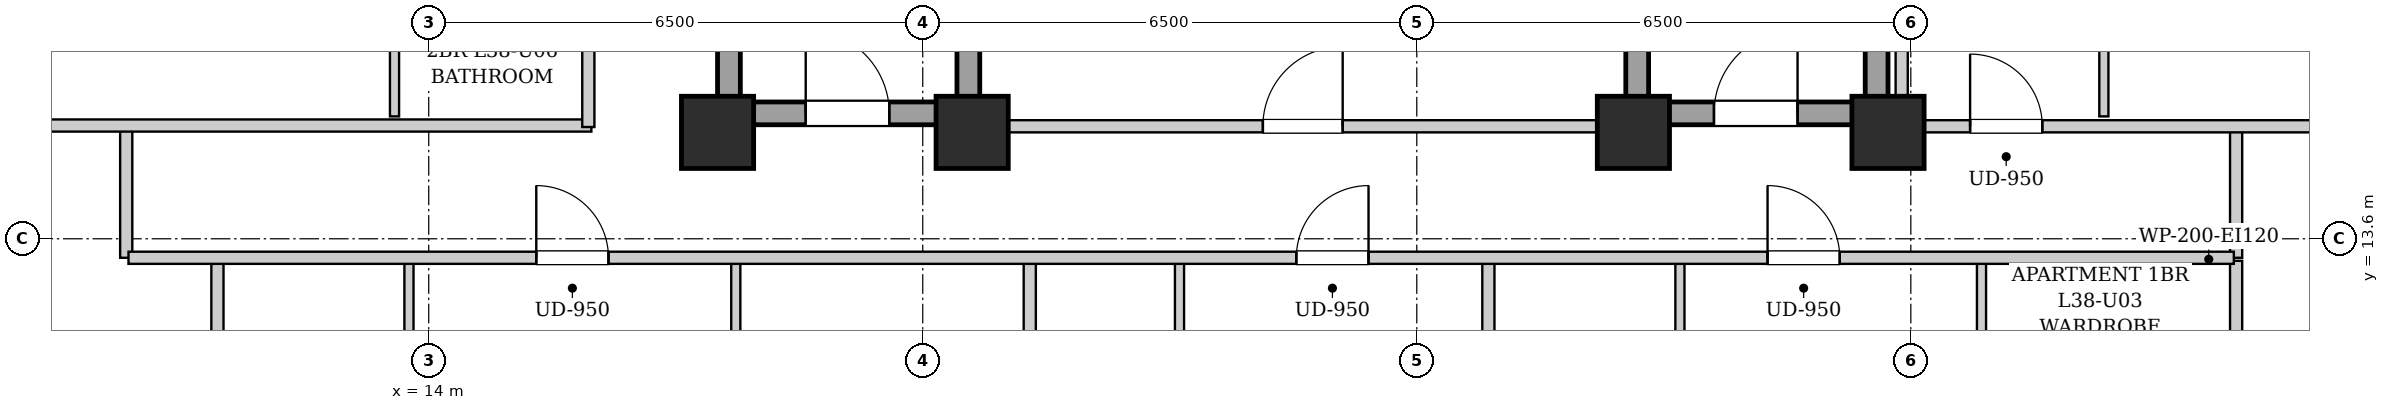
"""IFC4 building model, lengths in metres.
Left out: names, types, materials, properties, quantities, classifications, styles, units other than length and angle.
Written with IfcOpenShell. Run it as: python <this file> out.ifc"""

import sys

from ifc_helpers import new_model, si_unit, direction, frame, frame_2d, origin, origin_2d, place, context, subcontext, project, spatial, rectangle, extrude, element, fill, save


model = new_model("IFC4")
c1 = context("Model", 3, precision=1e-05, world=origin(), true_north=direction((0.0, 1.0)))
c2 = subcontext(c1, "Body", "Model", "MODEL_VIEW")
j1 = project(units=[si_unit("LENGTHUNIT", "METRE"), si_unit("PLANEANGLEUNIT", "RADIAN")], contexts=[c1])
p1 = place(None, origin())
s1 = spatial("IfcSite", under=j1, at=p1, CompositionType="ELEMENT")
p2 = place(p1, origin())
s2 = spatial("IfcBuilding", under=s1, at=p2, CompositionType="ELEMENT")
p3 = place(p2, frame((0.0, 0.0, 134.15)))
s3 = spatial("IfcBuildingStorey", under=s2, at=p3, CompositionType="ELEMENT", Elevation=134.15)
for number, where, z_axis, x_axis in (
    (1, (17.8, 15.0, 0.0), (0.0, 0.0, 1.0), (1.0, 0.0, 0.0)),
    (2, (21.15, 15.0, 0.0), (0.0, 0.0, 1.0), (1.0, 0.0, 0.0)),
    (3, (29.85, 15.0, 0.0), (0.0, 0.0, 1.0), (1.0, 0.0, 0.0)),
    (4, (33.2, 15.0, 0.0), (0.0, 0.0, 1.0), (1.0, 0.0, 0.0)),
):
    element("IfcColumn", number, at=place(p3, frame(where, z_axis=z_axis, x_axis=x_axis)), inside=s3, PredefinedType="COLUMN", context=c2, shape_type="SweptSolid", body=[
        extrude(rectangle(XDim=0.95, YDim=0.95, at=origin_2d()), origin(), (0.0, 0.0, 1.0), 3.25),
    ])
for number, where, z_axis, x_axis in (
    (5, (17.95, 15.1, 0.0), (0.0, 0.0, 1.0), (0.0, 1.0, 0.0)),
    (6, (21.1, 15.1, 0.0), (0.0, 0.0, 1.0), (0.0, 1.0, 0.0)),
):
    element("IfcWall", number, at=place(p3, frame(where, z_axis=z_axis, x_axis=x_axis)), inside=s3, PredefinedType="SHEAR", context=c2, shape_type="SweptSolid", body=[
        extrude(rectangle(XDim=9.0, YDim=0.3, at=frame_2d((4.5, 0.0))), origin(), (0.0, 0.0, 1.0), 2.99),
    ])
p4 = place(p3, frame((18.1, 15.25, 0.0), z_axis=(0.0, 0.0, 1.0), x_axis=(1.0, 0.0, 0.0)))
e7 = element("IfcWall", 7, at=p4, inside=s3, PredefinedType="SHEAR", context=c2, shape_type="SweptSolid", body=[
    extrude(rectangle(XDim=2.85, YDim=0.3, at=frame_2d((1.425, 0.0))), origin(), (0.0, 0.0, 1.0), 2.99),
])
p5 = place(p4, frame((0.86, 0.0, 0.0)))
e8 = element("IfcOpeningElement", 8, at=p5, cuts=e7, PredefinedType="OPENING", context=c2, shape_type="SweptSolid", body=[
    extrude(rectangle(XDim=1.1, YDim=2.05, at=frame_2d((0.55, 1.025))), frame((0.0, 0.16, 0.0), z_axis=(0.0, -1.0, 0.0), x_axis=(1.0, 0.0, 0.0)), (0.0, 0.0, 1.0), 0.32),
])
for number, where, z_axis, x_axis in (
    (9, (29.9, 15.1, 0.0), (0.0, 0.0, 1.0), (0.0, 1.0, 0.0)),
    (10, (33.05, 15.1, 0.0), (0.0, 0.0, 1.0), (0.0, 1.0, 0.0)),
):
    element("IfcWall", number, at=place(p3, frame(where, z_axis=z_axis, x_axis=x_axis)), inside=s3, PredefinedType="SHEAR", context=c2, shape_type="SweptSolid", body=[
        extrude(rectangle(XDim=9.0, YDim=0.3, at=frame_2d((4.5, 0.0))), origin(), (0.0, 0.0, 1.0), 2.99),
    ])
p6 = place(p3, frame((30.05, 15.25, 0.0), z_axis=(0.0, 0.0, 1.0), x_axis=(1.0, 0.0, 0.0)))
e11 = element("IfcWall", 11, at=p6, inside=s3, PredefinedType="SHEAR", context=c2, shape_type="SweptSolid", body=[
    extrude(rectangle(XDim=2.85, YDim=0.3, at=frame_2d((1.425, 0.0))), origin(), (0.0, 0.0, 1.0), 2.99),
])
p7 = place(p6, frame((0.86, 0.0, 0.0)))
e12 = element("IfcOpeningElement", 12, at=p7, cuts=e11, PredefinedType="OPENING", context=c2, shape_type="SweptSolid", body=[
    extrude(rectangle(XDim=1.1, YDim=2.05, at=frame_2d((0.55, 1.025))), frame((0.0, 0.16, 0.0), z_axis=(0.0, -1.0, 0.0), x_axis=(1.0, 0.0, 0.0)), (0.0, 0.0, 1.0), 0.32),
])
p8 = place(p3, frame((21.25, 15.08, 0.0), z_axis=(0.0, 0.0, 1.0), x_axis=(1.0, 0.0, 0.0)))
e13 = element("IfcWall", 13, at=p8, inside=s3, PredefinedType="PARTITIONING", context=c2, shape_type="SweptSolid", body=[
    extrude(rectangle(XDim=8.5, YDim=0.16, at=frame_2d((4.25, 0.0))), origin(), (0.0, 0.0, 1.0), 2.426),
])
p9 = place(p8, frame((3.725, 0.0, 0.0)))
e14 = element("IfcOpeningElement", 14, at=p9, cuts=e13, PredefinedType="OPENING", context=c2, shape_type="SweptSolid", body=[
    extrude(rectangle(XDim=1.05, YDim=2.05, at=frame_2d((0.525, 1.025))), frame((0.0, 0.09, 0.0), z_axis=(0.0, -1.0, 0.0), x_axis=(1.0, 0.0, 0.0)), (0.0, 0.0, 1.0), 0.18),
])
for number, where, z_axis, x_axis in (
    (15, (10.02, 13.35, 0.0), (0.0, 0.0, 1.0), (0.0, 1.0, 0.0)),
    (16, (37.78, 13.35, 0.0), (0.0, 0.0, 1.0), (0.0, 1.0, 0.0)),
):
    element("IfcWall", number, at=place(p3, frame(where, z_axis=z_axis, x_axis=x_axis)), inside=s3, PredefinedType="PARTITIONING", context=c2, shape_type="SweptSolid", body=[
        extrude(rectangle(XDim=1.74, YDim=0.16, at=frame_2d((0.87, 0.0))), origin(), (0.0, 0.0, 1.0), 2.99),
    ])
p10 = place(p3, frame((7.78, 15.09, 0.0), z_axis=(0.0, 0.0, 1.0), x_axis=(1.0, 0.0, 0.0)))
e17 = element("IfcWall", 17, at=p10, inside=s3, PredefinedType="PARTITIONING", context=c2, shape_type="SweptSolid", body=[
    extrude(rectangle(XDim=8.36, YDim=0.16, at=frame_2d((4.18, 0.0))), origin(), (0.0, 0.0, 1.0), 2.426),
])
p11 = place(p3, frame((11.22, 4.08, 0.0), z_axis=(0.0, 0.0, 1.0), x_axis=(0.0, 1.0, 0.0)))
e18 = element("IfcWall", 18, at=p11, inside=s3, PredefinedType="PARTITIONING", context=c2, shape_type="SweptSolid", body=[
    extrude(rectangle(XDim=9.23, YDim=0.16, at=frame_2d((4.615, 0.0))), origin(), (0.0, 0.0, 1.0), 2.99),
])
p12 = place(p3, frame((13.74, 10.46, 0.0), z_axis=(0.0, 0.0, 1.0), x_axis=(0.0, 1.0, 0.0)))
e19 = element("IfcWall", 19, at=p12, inside=s3, PredefinedType="PARTITIONING", context=c2, shape_type="SweptSolid", body=[
    extrude(rectangle(XDim=2.85, YDim=0.12, at=frame_2d((1.425, 0.0))), origin(), (0.0, 0.0, 1.0), 2.99),
])
p13 = place(p12, frame((0.995, 0.0, 0.0)))
e20 = element("IfcOpeningElement", 20, at=p13, cuts=e19, PredefinedType="OPENING", context=c2, shape_type="SweptSolid", body=[
    extrude(rectangle(XDim=0.86, YDim=2.05, at=frame_2d((0.43, 1.025))), frame((0.0, 0.07, 0.0), z_axis=(0.0, -1.0, 0.0), x_axis=(1.0, 0.0, 0.0)), (0.0, 0.0, 1.0), 0.14),
])
p14 = place(p3, frame((18.04, 10.46, 0.0), z_axis=(0.0, 0.0, 1.0), x_axis=(0.0, 1.0, 0.0)))
e21 = element("IfcWall", 21, at=p14, inside=s3, PredefinedType="PARTITIONING", context=c2, shape_type="SweptSolid", body=[
    extrude(rectangle(XDim=2.85, YDim=0.12, at=frame_2d((1.425, 0.0))), origin(), (0.0, 0.0, 1.0), 2.99),
])
p15 = place(p14, frame((0.975, 0.0, 0.0)))
e22 = element("IfcOpeningElement", 22, at=p15, cuts=e21, PredefinedType="OPENING", context=c2, shape_type="SweptSolid", body=[
    extrude(rectangle(XDim=0.9, YDim=2.05, at=frame_2d((0.45, 1.025))), frame((0.0, 0.07, 0.0), z_axis=(0.0, -1.0, 0.0), x_axis=(1.0, 0.0, 0.0)), (0.0, 0.0, 1.0), 0.14),
])
p16 = place(p3, frame((21.908, 4.08, 0.0), z_axis=(0.0, 0.0, 1.0), x_axis=(0.0, 1.0, 0.0)))
e23 = element("IfcWall", 23, at=p16, inside=s3, PredefinedType="PARTITIONING", context=c2, shape_type="SweptSolid", body=[
    extrude(rectangle(XDim=9.23, YDim=0.16, at=frame_2d((4.615, 0.0))), origin(), (0.0, 0.0, 1.0), 2.99),
])
p17 = place(p3, frame((23.878, 10.46, 0.0), z_axis=(0.0, 0.0, 1.0), x_axis=(0.0, 1.0, 0.0)))
e24 = element("IfcWall", 24, at=p17, inside=s3, PredefinedType="PARTITIONING", context=c2, shape_type="SweptSolid", body=[
    extrude(rectangle(XDim=2.85, YDim=0.12, at=frame_2d((1.425, 0.0))), origin(), (0.0, 0.0, 1.0), 2.99),
])
p18 = place(p17, frame((0.995, 0.0, 0.0)))
e25 = element("IfcOpeningElement", 25, at=p18, cuts=e24, PredefinedType="OPENING", context=c2, shape_type="SweptSolid", body=[
    extrude(rectangle(XDim=0.86, YDim=2.05, at=frame_2d((0.43, 1.025))), frame((0.0, 0.07, 0.0), z_axis=(0.0, -1.0, 0.0), x_axis=(1.0, 0.0, 0.0)), (0.0, 0.0, 1.0), 0.14),
])
p19 = place(p3, frame((37.78, 10.4, 0.0), z_axis=(0.0, 0.0, 1.0), x_axis=(0.0, 1.0, 0.0)))
e26 = element("IfcWall", 26, at=p19, inside=s3, PredefinedType="PARTITIONING", context=c2, shape_type="SweptSolid", body=[
    extrude(rectangle(XDim=2.91, YDim=0.16, at=frame_2d((1.455, 0.0))), origin(), (0.0, 0.0, 1.0), 2.99),
])
p20 = place(p3, frame((27.942, 4.08, 0.0), z_axis=(0.0, 0.0, 1.0), x_axis=(0.0, 1.0, 0.0)))
e27 = element("IfcWall", 27, at=p20, inside=s3, PredefinedType="PARTITIONING", context=c2, shape_type="SweptSolid", body=[
    extrude(rectangle(XDim=9.23, YDim=0.16, at=frame_2d((4.615, 0.0))), origin(), (0.0, 0.0, 1.0), 2.99),
])
p21 = place(p3, frame((30.462, 10.46, 0.0), z_axis=(0.0, 0.0, 1.0), x_axis=(0.0, 1.0, 0.0)))
e28 = element("IfcWall", 28, at=p21, inside=s3, PredefinedType="PARTITIONING", context=c2, shape_type="SweptSolid", body=[
    extrude(rectangle(XDim=2.85, YDim=0.12, at=frame_2d((1.425, 0.0))), origin(), (0.0, 0.0, 1.0), 2.99),
])
p22 = place(p21, frame((0.995, 0.0, 0.0)))
e29 = element("IfcOpeningElement", 29, at=p22, cuts=e28, PredefinedType="OPENING", context=c2, shape_type="SweptSolid", body=[
    extrude(rectangle(XDim=0.86, YDim=2.05, at=frame_2d((0.43, 1.025))), frame((0.0, 0.07, 0.0), z_axis=(0.0, -1.0, 0.0), x_axis=(1.0, 0.0, 0.0)), (0.0, 0.0, 1.0), 0.14),
])
p23 = place(p3, frame((34.43, 10.46, 0.0), z_axis=(0.0, 0.0, 1.0), x_axis=(0.0, 1.0, 0.0)))
e30 = element("IfcWall", 30, at=p23, inside=s3, PredefinedType="PARTITIONING", context=c2, shape_type="SweptSolid", body=[
    extrude(rectangle(XDim=2.85, YDim=0.12, at=frame_2d((1.425, 0.0))), origin(), (0.0, 0.0, 1.0), 2.99),
])
p24 = place(p23, frame((0.975, 0.0, 0.0)))
e31 = element("IfcOpeningElement", 31, at=p24, cuts=e30, PredefinedType="OPENING", context=c2, shape_type="SweptSolid", body=[
    extrude(rectangle(XDim=0.9, YDim=2.05, at=frame_2d((0.45, 1.025))), frame((0.0, 0.07, 0.0), z_axis=(0.0, -1.0, 0.0), x_axis=(1.0, 0.0, 0.0)), (0.0, 0.0, 1.0), 0.14),
])
p25 = place(p3, frame((13.55, 15.21, 0.0), z_axis=(0.0, 0.0, 1.0), x_axis=(0.0, 1.0, 0.0)))
e32 = element("IfcWall", 32, at=p25, inside=s3, PredefinedType="PARTITIONING", context=c2, shape_type="SweptSolid", body=[
    extrude(rectangle(XDim=2.3, YDim=0.12, at=frame_2d((1.15, 0.0))), origin(), (0.0, 0.0, 1.0), 2.99),
])
p26 = place(p3, frame((33.38, 15.08, 0.0), z_axis=(0.0, 0.0, 1.0), x_axis=(1.0, 0.0, 0.0)))
e33 = element("IfcWall", 33, at=p26, inside=s3, PredefinedType="PARTITIONING", context=c2, shape_type="SweptSolid", body=[
    extrude(rectangle(XDim=6.64, YDim=0.16, at=frame_2d((3.32, 0.0))), origin(), (0.0, 0.0, 1.0), 2.426),
])
p27 = place(p26, frame((0.9, 0.0, 0.0)))
e34 = element("IfcOpeningElement", 34, at=p27, cuts=e33, PredefinedType="OPENING", context=c2, shape_type="SweptSolid", body=[
    extrude(rectangle(XDim=0.95, YDim=2.1, at=frame_2d((0.475, 1.05))), frame((0.0, 0.09, 0.0), z_axis=(0.0, -1.0, 0.0), x_axis=(1.0, 0.0, 0.0)), (0.0, 0.0, 1.0), 0.18),
])
p28 = place(p3, frame((36.04, 15.21, 0.0), z_axis=(0.0, 0.0, 1.0), x_axis=(0.0, 1.0, 0.0)))
e35 = element("IfcWall", 35, at=p28, inside=s3, PredefinedType="PARTITIONING", context=c2, shape_type="SweptSolid", body=[
    extrude(rectangle(XDim=4.5, YDim=0.12, at=frame_2d((2.25, 0.0))), origin(), (0.0, 0.0, 1.0), 2.99),
])
p29 = place(p28, frame((1.8, 0.0, 0.0)))
e36 = element("IfcOpeningElement", 36, at=p29, cuts=e35, PredefinedType="OPENING", context=c2, shape_type="SweptSolid", body=[
    extrude(rectangle(XDim=0.9, YDim=2.05, at=frame_2d((0.45, 1.025))), frame((0.0, 0.07, 0.0), z_axis=(0.0, -1.0, 0.0), x_axis=(1.0, 0.0, 0.0)), (0.0, 0.0, 1.0), 0.14),
])
p30 = place(p3, frame((10.05, 13.35, 0.0), z_axis=(0.0, 0.0, 1.0), x_axis=(1.0, 0.0, 0.0)))
e37 = element("IfcWall", 37, at=p30, inside=s3, PredefinedType="PARTITIONING", context=c2, shape_type="SweptSolid", body=[
    extrude(rectangle(XDim=27.7, YDim=0.16, at=frame_2d((13.85, 0.0))), origin(), (0.0, 0.0, 1.0), 2.99),
])
p31 = place(p30, frame((5.365, 0.0, 0.0)))
e38 = element("IfcOpeningElement", 38, at=p31, cuts=e37, PredefinedType="OPENING", context=c2, shape_type="SweptSolid", body=[
    extrude(rectangle(XDim=0.95, YDim=2.1, at=frame_2d((0.475, 1.05))), frame((0.0, 0.09, 0.0), z_axis=(0.0, -1.0, 0.0), x_axis=(1.0, 0.0, 0.0)), (0.0, 0.0, 1.0), 0.18),
])
p32 = place(p30, frame((15.365, 0.0, 0.0)))
e39 = element("IfcOpeningElement", 39, at=p32, cuts=e37, PredefinedType="OPENING", context=c2, shape_type="SweptSolid", body=[
    extrude(rectangle(XDim=0.95, YDim=2.1, at=frame_2d((0.475, 1.05))), frame((0.0, 0.09, 0.0), z_axis=(0.0, -1.0, 0.0), x_axis=(1.0, 0.0, 0.0)), (0.0, 0.0, 1.0), 0.18),
])
p33 = place(p30, frame((21.565, 0.0, 0.0)))
e40 = element("IfcOpeningElement", 40, at=p33, cuts=e37, PredefinedType="OPENING", context=c2, shape_type="SweptSolid", body=[
    extrude(rectangle(XDim=0.95, YDim=2.1, at=frame_2d((0.475, 1.05))), frame((0.0, 0.09, 0.0), z_axis=(0.0, -1.0, 0.0), x_axis=(1.0, 0.0, 0.0)), (0.0, 0.0, 1.0), 0.18),
])
p34 = place(p3, frame((16.1, 15.07, 0.0), z_axis=(0.0, 0.0, 1.0), x_axis=(0.0, 1.0, 0.0)))
e41 = element("IfcWall", 41, at=p34, inside=s3, PredefinedType="PARTITIONING", context=c2, shape_type="SweptSolid", body=[
    extrude(rectangle(XDim=13.93, YDim=0.16, at=frame_2d((6.965, 0.0))), origin(), (0.0, 0.0, 1.0), 2.99),
])
p35 = place(p34, frame((4.385, 0.0, 0.0)))
e42 = element("IfcOpeningElement", 42, at=p35, cuts=e41, PredefinedType="OPENING", context=c2, shape_type="SweptSolid", body=[
    extrude(rectangle(XDim=0.95, YDim=2.1, at=frame_2d((0.475, 1.05))), frame((0.0, 0.09, 0.0), z_axis=(0.0, -1.0, 0.0), x_axis=(1.0, 0.0, 0.0)), (0.0, 0.0, 1.0), 0.18),
])
p36 = place(p3, frame((33.38, 15.02, 0.0), z_axis=(0.0, 0.0, 1.0), x_axis=(0.0, 1.0, 0.0)))
e43 = element("IfcWall", 43, at=p36, inside=s3, PredefinedType="PARTITIONING", context=c2, shape_type="SweptSolid", body=[
    extrude(rectangle(XDim=13.98, YDim=0.16, at=frame_2d((6.99, 0.0))), origin(), (0.0, 0.0, 1.0), 2.99),
])
p37 = place(p5, origin())
e44 = element("IfcDoor", 44, at=p37, inside=s3, OperationType="SINGLE_SWING_LEFT", PredefinedType="DOOR", context=c2, shape_type="SweptSolid", body=[
    extrude(rectangle(XDim=1.1, YDim=2.05, at=frame_2d((0.55, 1.025))), frame((0.0, 0.025, 0.0), z_axis=(0.0, -1.0, 0.0), x_axis=(1.0, 0.0, 0.0)), (0.0, 0.0, 1.0), 0.05),
])
fill(e8, e44)
p38 = place(p7, origin())
e45 = element("IfcDoor", 45, at=p38, inside=s3, OperationType="SINGLE_SWING_RIGHT", PredefinedType="DOOR", context=c2, shape_type="SweptSolid", body=[
    extrude(rectangle(XDim=1.1, YDim=2.05, at=frame_2d((0.55, 1.025))), frame((0.0, 0.025, 0.0), z_axis=(0.0, -1.0, 0.0), x_axis=(1.0, 0.0, 0.0)), (0.0, 0.0, 1.0), 0.05),
])
fill(e12, e45)
p39 = place(p9, origin())
e46 = element("IfcDoor", 46, at=p39, inside=s3, OperationType="SINGLE_SWING_RIGHT", PredefinedType="DOOR", context=c2, shape_type="SweptSolid", body=[
    extrude(rectangle(XDim=1.05, YDim=2.05, at=frame_2d((0.525, 1.025))), frame((0.0, 0.025, 0.0), z_axis=(0.0, -1.0, 0.0), x_axis=(1.0, 0.0, 0.0)), (0.0, 0.0, 1.0), 0.05),
])
fill(e14, e46)
p40 = place(p27, origin())
e47 = element("IfcDoor", 47, at=p40, inside=s3, OperationType="SINGLE_SWING_LEFT", PredefinedType="DOOR", context=c2, shape_type="SweptSolid", body=[
    extrude(rectangle(XDim=0.95, YDim=2.1, at=frame_2d((0.475, 1.05))), frame((0.0, 0.025, 0.0), z_axis=(0.0, -1.0, 0.0), x_axis=(1.0, 0.0, 0.0)), (0.0, 0.0, 1.0), 0.05),
])
fill(e34, e47)
p41 = place(p31, origin())
e48 = element("IfcDoor", 48, at=p41, inside=s3, OperationType="SINGLE_SWING_LEFT", PredefinedType="DOOR", context=c2, shape_type="SweptSolid", body=[
    extrude(rectangle(XDim=0.95, YDim=2.1, at=frame_2d((0.475, 1.05))), frame((0.0, 0.025, 0.0), z_axis=(0.0, -1.0, 0.0), x_axis=(1.0, 0.0, 0.0)), (0.0, 0.0, 1.0), 0.05),
])
fill(e38, e48)
p42 = place(p32, origin())
e49 = element("IfcDoor", 49, at=p42, inside=s3, OperationType="SINGLE_SWING_RIGHT", PredefinedType="DOOR", context=c2, shape_type="SweptSolid", body=[
    extrude(rectangle(XDim=0.95, YDim=2.1, at=frame_2d((0.475, 1.05))), frame((0.0, 0.025, 0.0), z_axis=(0.0, -1.0, 0.0), x_axis=(1.0, 0.0, 0.0)), (0.0, 0.0, 1.0), 0.05),
])
fill(e39, e49)
p43 = place(p33, origin())
e50 = element("IfcDoor", 50, at=p43, inside=s3, OperationType="SINGLE_SWING_LEFT", PredefinedType="DOOR", context=c2, shape_type="SweptSolid", body=[
    extrude(rectangle(XDim=0.95, YDim=2.1, at=frame_2d((0.475, 1.05))), frame((0.0, 0.025, 0.0), z_axis=(0.0, -1.0, 0.0), x_axis=(1.0, 0.0, 0.0)), (0.0, 0.0, 1.0), 0.05),
])
fill(e40, e50)
save(model, sys.argv[1])
